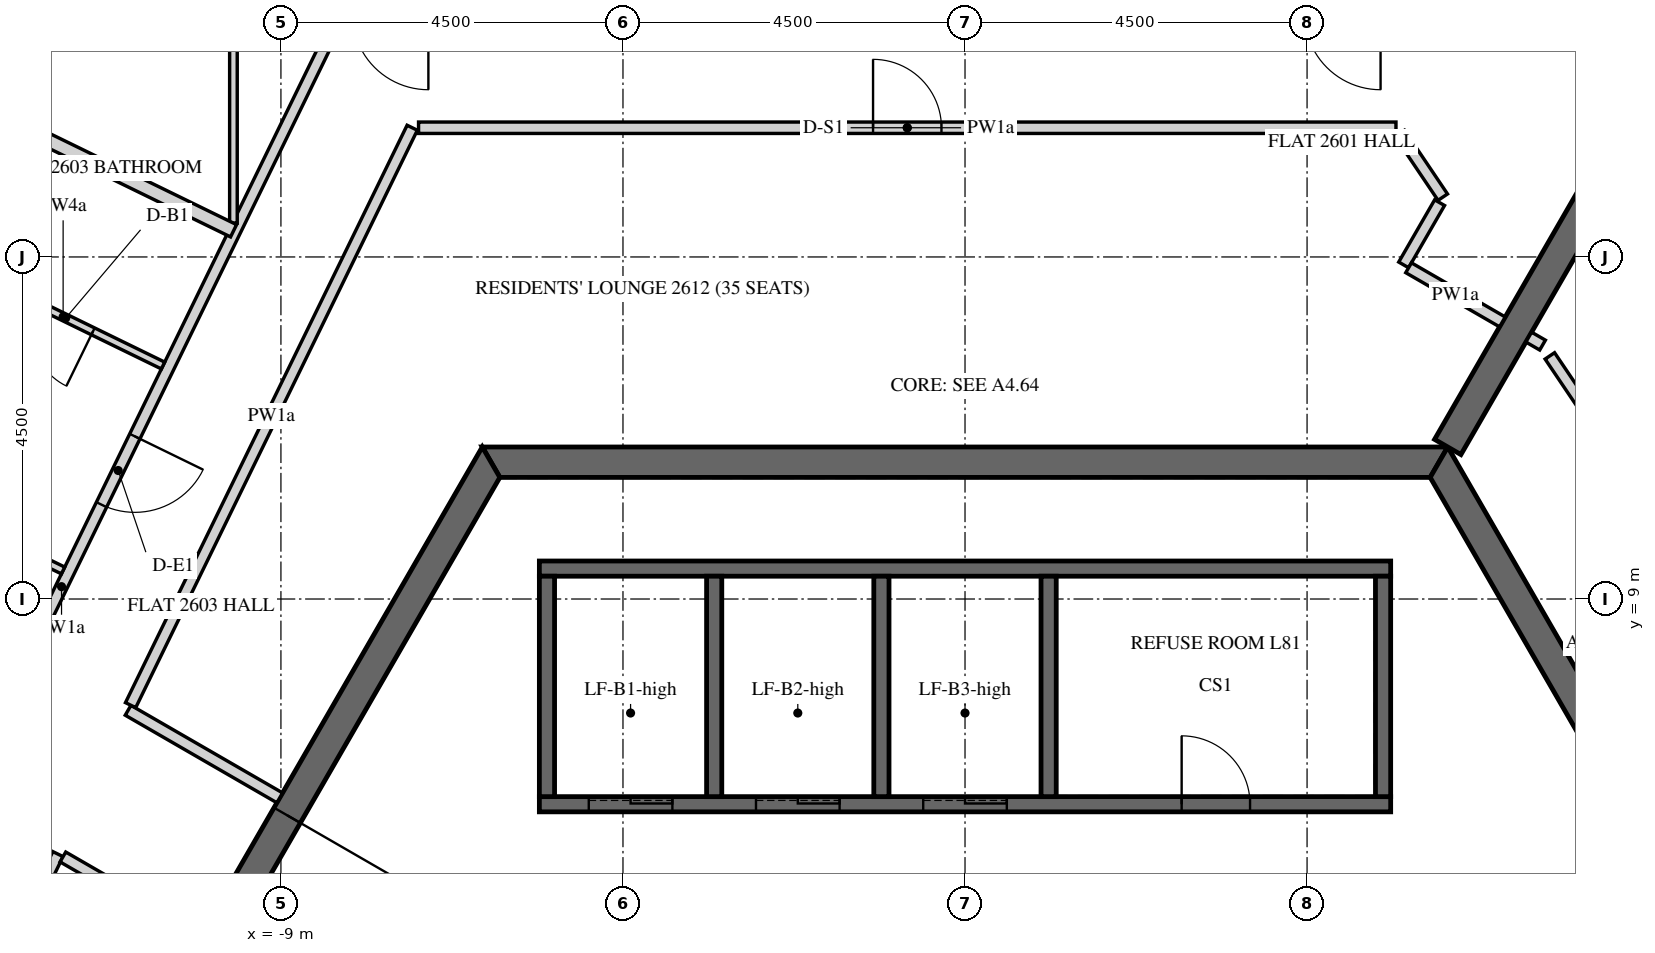
"""IFC4 building model, lengths in metres.
Left out: names, types, materials, properties, quantities, classifications, styles, units other than length and angle.
Written with IfcOpenShell. Run it as: python <this file> out.ifc"""

import sys

from ifc_helpers import new_model, si_unit, direction, frame, frame_2d, origin, place, context, subcontext, project, spatial, polyline, rectangle, outline, extrude, element, fill, save


model = new_model("IFC4")
c1 = context("Model", 3, precision=1e-05, world=origin(), true_north=direction((0.0, 1.0)))
c2 = subcontext(c1, "Body", "Model", "MODEL_VIEW")
j1 = project(units=[si_unit("LENGTHUNIT", "METRE"), si_unit("PLANEANGLEUNIT", "RADIAN")], contexts=[c1])
p1 = place(None, origin())
s1 = spatial("IfcSite", under=j1, at=p1, CompositionType="ELEMENT")
p2 = place(p1, origin())
s2 = spatial("IfcBuilding", under=s1, at=p2, CompositionType="ELEMENT")
p3 = place(p2, frame((0.0, 0.0, 334.2)))
s3 = spatial("IfcBuildingStorey", under=s2, at=p3, CompositionType="ELEMENT", Elevation=334.2)
p4 = place(p3, frame((-6.235, 10.8, -0.15), z_axis=(0.0, 0.0, 1.0), x_axis=(-0.499996419489, -0.866027470984, 0.0)))
e1 = element("IfcWall", 1, at=p4, inside=s3, PredefinedType="SHEAR", context=c2, shape_type="SweptSolid", body=[
    extrude(outline(polyline([(-0.115, -0.2), (12.586, -0.2), (12.355, 0.2), (0.115, 0.2), (-0.115, -0.2)])), origin(), (0.0, 0.0, 1.0), 3.75),
])
p5 = place(p4, frame((5.364, 0.0, 0.15)))
e2 = element("IfcOpeningElement", 2, at=p5, cuts=e1, PredefinedType="OPENING", context=c2, shape_type="SweptSolid", body=[
    extrude(rectangle(XDim=1.8, YDim=2.4, at=frame_2d((0.9, 1.2))), frame((0.0, 0.21, 0.0), z_axis=(0.0, -1.0, 0.0), x_axis=(1.0, 0.0, 0.0)), (0.0, 0.0, 1.0), 0.42),
])
p6 = place(p3, frame((12.471, 0.0, -0.15), z_axis=(0.0, 0.0, 1.0), x_axis=(-0.499996419489, 0.866027470984, 0.0)))
e3 = element("IfcWall", 3, at=p6, inside=s3, PredefinedType="SHEAR", context=c2, shape_type="SweptSolid", body=[
    extrude(outline(polyline([(-0.115, -0.2), (12.586, -0.2), (12.355, 0.2), (0.115, 0.2), (-0.115, -0.2)])), origin(), (0.0, 0.0, 1.0), 3.75),
])
p7 = place(p6, frame((5.306, 0.0, 0.15)))
e4 = element("IfcOpeningElement", 4, at=p7, cuts=e3, PredefinedType="OPENING", context=c2, shape_type="SweptSolid", body=[
    extrude(rectangle(XDim=1.8, YDim=2.4, at=frame_2d((0.9, 1.2))), frame((0.0, 0.21, 0.0), z_axis=(0.0, -1.0, 0.0), x_axis=(1.0, 0.0, 0.0)), (0.0, 0.0, 1.0), 0.42),
])
p8 = place(p3, frame((6.235, 10.8, -0.15), z_axis=(0.0, 0.0, 1.0), x_axis=(-1.0, 0.0, 0.0)))
e5 = element("IfcWall", 5, at=p8, inside=s3, PredefinedType="SHEAR", context=c2, shape_type="SweptSolid", body=[
    extrude(outline(polyline([(-0.115, -0.2), (12.586, -0.2), (12.355, 0.2), (0.115, 0.2), (-0.115, -0.2)])), origin(), (0.0, 0.0, 1.0), 3.75),
])
p9 = place(p3, frame((6.351, 11.0, -0.15), z_axis=(0.0, 0.0, 1.0), x_axis=(0.499998894578, 0.866026041999, 0.0)))
e6 = element("IfcWall", 6, at=p9, inside=s3, PredefinedType="SHEAR", context=c2, shape_type="SweptSolid", body=[
    extrude(rectangle(XDim=15.544, YDim=0.4, at=frame_2d((7.772, 0.0))), origin(), (0.0, 0.0, 1.0), 3.75),
])
p10 = place(p9, frame((6.872, 0.0, 0.15)))
e7 = element("IfcOpeningElement", 7, at=p10, cuts=e6, PredefinedType="OPENING", context=c2, shape_type="SweptSolid", body=[
    extrude(rectangle(XDim=1.8, YDim=2.4, at=frame_2d((0.9, 1.2))), frame((0.0, 0.21, 0.0), z_axis=(0.0, -1.0, 0.0), x_axis=(1.0, 0.0, 0.0)), (0.0, 0.0, 1.0), 0.42),
])
p11 = place(p3, frame((-5.6, 6.3, -0.25), z_axis=(0.0, 0.0, 1.0), x_axis=(1.0, 0.0, 0.0)))
e8 = element("IfcWall", 8, at=p11, inside=s3, PredefinedType="SHEAR", context=c2, shape_type="SweptSolid", body=[
    extrude(rectangle(XDim=11.2, YDim=0.2, at=frame_2d((5.6, 0.0))), origin(), (0.0, 0.0, 1.0), 3.9),
])
p12 = place(p11, frame((8.45, 0.0, 0.25)))
e9 = element("IfcOpeningElement", 9, at=p12, cuts=e8, PredefinedType="OPENING", context=c2, shape_type="SweptSolid", body=[
    extrude(rectangle(XDim=0.9, YDim=2.1, at=frame_2d((0.45, 1.05))), frame((0.0, 0.11, 0.0), z_axis=(0.0, -1.0, 0.0), x_axis=(1.0, 0.0, 0.0)), (0.0, 0.0, 1.0), 0.22),
])
p13 = place(p11, frame((0.65, 0.0, 0.25)))
e10 = element("IfcOpeningElement", 10, at=p13, cuts=e8, PredefinedType="OPENING", context=c2, shape_type="SweptSolid", body=[
    extrude(rectangle(XDim=1.1, YDim=2.1, at=frame_2d((0.55, 1.05))), frame((0.0, 0.11, 0.0), z_axis=(0.0, -1.0, 0.0), x_axis=(1.0, 0.0, 0.0)), (0.0, 0.0, 1.0), 0.22),
])
p14 = place(p11, frame((2.85, 0.0, 0.25)))
e11 = element("IfcOpeningElement", 11, at=p14, cuts=e8, PredefinedType="OPENING", context=c2, shape_type="SweptSolid", body=[
    extrude(rectangle(XDim=1.1, YDim=2.1, at=frame_2d((0.55, 1.05))), frame((0.0, 0.11, 0.0), z_axis=(0.0, -1.0, 0.0), x_axis=(1.0, 0.0, 0.0)), (0.0, 0.0, 1.0), 0.22),
])
p15 = place(p11, frame((5.05, 0.0, 0.25)))
e12 = element("IfcOpeningElement", 12, at=p15, cuts=e8, PredefinedType="OPENING", context=c2, shape_type="SweptSolid", body=[
    extrude(rectangle(XDim=1.1, YDim=2.1, at=frame_2d((0.55, 1.05))), frame((0.0, 0.11, 0.0), z_axis=(0.0, -1.0, 0.0), x_axis=(1.0, 0.0, 0.0)), (0.0, 0.0, 1.0), 0.22),
])
p16 = place(p3, frame((-5.6, 9.4, -0.25), z_axis=(0.0, 0.0, 1.0), x_axis=(1.0, 0.0, 0.0)))
e13 = element("IfcWall", 13, at=p16, inside=s3, PredefinedType="SHEAR", context=c2, shape_type="SweptSolid", body=[
    extrude(rectangle(XDim=11.2, YDim=0.2, at=frame_2d((5.6, 0.0))), origin(), (0.0, 0.0, 1.0), 3.9),
])
for number, where, z_axis, x_axis in (
    (14, (-5.5, 6.4, -0.25), (0.0, 0.0, 1.0), (0.0, 1.0, 0.0)),
    (15, (-3.3, 6.4, -0.25), (0.0, 0.0, 1.0), (0.0, 1.0, 0.0)),
    (16, (-1.1, 6.4, -0.25), (0.0, 0.0, 1.0), (0.0, 1.0, 0.0)),
    (17, (1.1, 6.4, -0.25), (0.0, 0.0, 1.0), (0.0, 1.0, 0.0)),
    (18, (5.5, 6.4, -0.25), (0.0, 0.0, 1.0), (0.0, 1.0, 0.0)),
):
    element("IfcWall", number, at=place(p3, frame(where, z_axis=z_axis, x_axis=x_axis)), inside=s3, PredefinedType="SHEAR", context=c2, shape_type="SweptSolid", body=[
        extrude(rectangle(XDim=2.9, YDim=0.2, at=frame_2d((1.45, 0.0))), origin(), (0.0, 0.0, 1.0), 3.9),
    ])
p17 = place(p3, frame((-8.247, 16.625, 0.0), z_axis=(0.0, 0.0, 1.0), x_axis=(-0.438376416131, -0.89879147625, 0.0)))
e19 = element("IfcWall", 19, at=p17, inside=s3, PredefinedType="PARTITIONING", context=c2, shape_type="SweptSolid", body=[
    extrude(rectangle(XDim=16.606, YDim=0.15, at=frame_2d((8.303, 0.0))), origin(), (0.0, 0.0, 1.0), 2.838),
])
p18 = place(p17, frame((6.103, 0.0, 0.0)))
e20 = element("IfcOpeningElement", 20, at=p18, cuts=e19, PredefinedType="OPENING", context=c2, shape_type="SweptSolid", body=[
    extrude(rectangle(XDim=1.0, YDim=2.1, at=frame_2d((0.5, 1.05))), frame((0.0, 0.085, 0.0), z_axis=(0.0, -1.0, 0.0), x_axis=(1.0, 0.0, 0.0)), (0.0, 0.0, 1.0), 0.17),
])
p19 = place(p3, frame((-9.016, 6.384, 0.0), z_axis=(0.0, 0.0, 1.0), x_axis=(-0.866030286288, 0.49999154316, 0.0)))
e21 = element("IfcWall", 21, at=p19, inside=s3, PredefinedType="PARTITIONING", context=c2, shape_type="SweptSolid", body=[
    extrude(rectangle(XDim=2.304, YDim=0.15, at=frame_2d((1.152, 0.0))), origin(), (0.0, 0.0, 1.0), 2.838),
])
p20 = place(p3, frame((-10.978, 7.604, 0.0), z_axis=(0.0, 0.0, 1.0), x_axis=(0.43838720727, 0.898786212902, 0.0)))
e22 = element("IfcWall", 22, at=p20, inside=s3, PredefinedType="PARTITIONING", context=c2, shape_type="SweptSolid", body=[
    extrude(rectangle(XDim=8.452, YDim=0.15, at=frame_2d((4.226, 0.0))), origin(), (0.0, 0.0, 1.0), 2.838),
])
p21 = place(p3, frame((-7.189, 15.2, 0.0), z_axis=(0.0, 0.0, 1.0), x_axis=(1.0, 0.0, 0.0)))
e23 = element("IfcWall", 23, at=p21, inside=s3, PredefinedType="PARTITIONING", context=c2, shape_type="SweptSolid", body=[
    extrude(rectangle(XDim=12.859, YDim=0.15, at=frame_2d((6.429, 0.0))), origin(), (0.0, 0.0, 1.0), 2.838),
])
p22 = place(p21, frame((5.979, 0.0, 0.0)))
e24 = element("IfcOpeningElement", 24, at=p22, cuts=e23, PredefinedType="OPENING", context=c2, shape_type="SweptSolid", body=[
    extrude(rectangle(XDim=0.9, YDim=2.1, at=frame_2d((0.45, 1.05))), frame((0.0, 0.085, 0.0), z_axis=(0.0, -1.0, 0.0), x_axis=(1.0, 0.0, 0.0)), (0.0, 0.0, 1.0), 0.17),
])
p23 = place(p3, frame((5.72, 15.125, 0.0), z_axis=(0.0, 0.0, 1.0), x_axis=(0.559095340605, -0.829103371187, 0.0)))
e25 = element("IfcWall", 25, at=p23, inside=s3, PredefinedType="PARTITIONING", context=c2, shape_type="SweptSolid", body=[
    extrude(rectangle(XDim=1.011, YDim=0.15, at=frame_2d((0.505, 0.0))), origin(), (0.0, 0.0, 1.0), 2.838),
])
p24 = place(p3, frame((6.244, 14.215, 0.0), z_axis=(0.0, 0.0, 1.0), x_axis=(-0.499998034377, -0.866026538634, 0.0)))
e26 = element("IfcWall", 26, at=p24, inside=s3, PredefinedType="PARTITIONING", context=c2, shape_type="SweptSolid", body=[
    extrude(rectangle(XDim=0.946, YDim=0.15, at=frame_2d((0.473, 0.0))), origin(), (0.0, 0.0, 1.0), 2.838),
])
p25 = place(p3, frame((5.836, 13.358, 0.0), z_axis=(0.0, 0.0, 1.0), x_axis=(0.865988727248, -0.500063520245, 0.0)))
e27 = element("IfcWall", 27, at=p25, inside=s3, PredefinedType="PARTITIONING", context=c2, shape_type="SweptSolid", body=[
    extrude(rectangle(XDim=1.425, YDim=0.15, at=frame_2d((0.712, 0.0))), origin(), (0.0, 0.0, 1.0), 2.838),
])
p26 = place(p3, frame((-14.411, 0.564, 0.0), z_axis=(0.0, 0.0, 1.0), x_axis=(0.438363210996, 0.898797916801, 0.0)))
e28 = element("IfcWall", 28, at=p26, inside=s3, PredefinedType="PARTITIONING", context=c2, shape_type="SweptSolid", body=[
    extrude(rectangle(XDim=5.652, YDim=0.15, at=frame_2d((2.826, 0.0))), origin(), (0.0, 0.0, 1.0), 2.838),
])
p27 = place(p26, frame((2.376, 0.0, 0.0)))
e29 = element("IfcOpeningElement", 29, at=p27, cuts=e28, PredefinedType="OPENING", context=c2, shape_type="SweptSolid", body=[
    extrude(rectangle(XDim=0.9, YDim=2.1, at=frame_2d((0.45, 1.05))), frame((0.0, 0.085, 0.0), z_axis=(0.0, -1.0, 0.0), x_axis=(1.0, 0.0, 0.0)), (0.0, 0.0, 1.0), 0.17),
])
p28 = place(p3, frame((-11.868, 5.606, 0.0), z_axis=(0.0, 0.0, 1.0), x_axis=(0.866033244403, -0.499986419405, 0.0)))
e30 = element("IfcWall", 30, at=p28, inside=s3, PredefinedType="PARTITIONING", context=c2, shape_type="SweptSolid", body=[
    extrude(rectangle(XDim=2.082, YDim=0.15, at=frame_2d((1.041, 0.0))), origin(), (0.0, 0.0, 1.0), 2.838),
])
p29 = place(p3, frame((7.416, 12.446, 0.0), z_axis=(0.0, 0.0, 1.0), x_axis=(0.866378867349, -0.499387282788, 0.0)))
e31 = element("IfcWall", 31, at=p29, inside=s3, PredefinedType="PARTITIONING", context=c2, shape_type="SweptSolid", body=[
    extrude(rectangle(XDim=0.21, YDim=0.15, at=frame_2d((0.105, 0.0))), origin(), (0.0, 0.0, 1.0), 2.838),
])
p30 = place(p3, frame((7.694, 12.199, 0.0), z_axis=(0.0, 0.0, 1.0), x_axis=(0.55920112739, -0.829032025392, 0.0)))
e32 = element("IfcWall", 32, at=p30, inside=s3, PredefinedType="PARTITIONING", context=c2, shape_type="SweptSolid", body=[
    extrude(rectangle(XDim=5.71, YDim=0.15, at=frame_2d((2.855, 0.0))), origin(), (0.0, 0.0, 1.0), 2.838),
])
p31 = place(p30, frame((2.405, 0.0, 0.0)))
e33 = element("IfcOpeningElement", 33, at=p31, cuts=e32, PredefinedType="OPENING", context=c2, shape_type="SweptSolid", body=[
    extrude(rectangle(XDim=0.9, YDim=2.1, at=frame_2d((0.45, 1.05))), frame((0.0, 0.085, 0.0), z_axis=(0.0, -1.0, 0.0), x_axis=(1.0, 0.0, 0.0)), (0.0, 0.0, 1.0), 0.17),
])
p32 = place(p3, frame((-9.625, 13.945, 0.0), z_axis=(0.0, 0.0, 1.0), x_axis=(0.0, 1.0, 0.0)))
e34 = element("IfcWall", 34, at=p32, inside=s3, PredefinedType="PARTITIONING", context=c2, shape_type="SweptSolid", body=[
    extrude(rectangle(XDim=6.955, YDim=0.1, at=frame_2d((3.477, 0.0))), origin(), (0.0, 0.0, 1.0), 2.838),
])
p33 = place(p32, frame((4.405, 0.0, 0.0)))
e35 = element("IfcOpeningElement", 35, at=p33, cuts=e34, PredefinedType="OPENING", context=c2, shape_type="SweptSolid", body=[
    extrude(rectangle(XDim=0.9, YDim=2.1, at=frame_2d((0.45, 1.05))), frame((0.0, 0.06, 0.0), z_axis=(0.0, -1.0, 0.0), x_axis=(1.0, 0.0, 0.0)), (0.0, 0.0, 1.0), 0.12),
])
p34 = place(p3, frame((-17.516, 17.694, 0.0), z_axis=(0.0, 0.0, 1.0), x_axis=(0.898787414812, -0.438384743092, 0.0)))
e36 = element("IfcWall", 36, at=p34, inside=s3, PredefinedType="PARTITIONING", context=c2, shape_type="SweptSolid", body=[
    extrude(rectangle(XDim=8.782, YDim=0.18, at=frame_2d((4.391, 0.0))), origin(), (0.0, 0.0, 1.0), 2.838),
])
p35 = place(p3, frame((-11.866, 9.375, 0.0), z_axis=(0.0, 0.0, 1.0), x_axis=(-0.89880694479, 0.438344699976, 0.0)))
e37 = element("IfcWall", 37, at=p35, inside=s3, PredefinedType="PARTITIONING", context=c2, shape_type="SweptSolid", body=[
    extrude(rectangle(XDim=2.925, YDim=0.1, at=frame_2d((1.462, 0.0))), origin(), (0.0, 0.0, 1.0), 2.838),
])
p36 = place(p35, frame((0.975, 0.0, 0.0)))
e38 = element("IfcOpeningElement", 38, at=p36, cuts=e37, PredefinedType="OPENING", context=c2, shape_type="SweptSolid", body=[
    extrude(rectangle(XDim=0.9, YDim=2.1, at=frame_2d((0.45, 1.05))), frame((0.0, 0.06, 0.0), z_axis=(0.0, -1.0, 0.0), x_axis=(1.0, 0.0, 0.0)), (0.0, 0.0, 1.0), 0.12),
])
p37 = place(p3, frame((-10.551, 12.072, 0.0), z_axis=(0.0, 0.0, 1.0), x_axis=(-0.898790906006, 0.438377585285, 0.0)))
e39 = element("IfcWall", 39, at=p37, inside=s3, PredefinedType="PARTITIONING", context=c2, shape_type="SweptSolid", body=[
    extrude(rectangle(XDim=2.925, YDim=0.1, at=frame_2d((1.462, 0.0))), origin(), (0.0, 0.0, 1.0), 2.838),
])
p38 = place(p37, frame((1.025, 0.0, 0.0)))
e40 = element("IfcOpeningElement", 40, at=p38, cuts=e39, PredefinedType="OPENING", context=c2, shape_type="SweptSolid", body=[
    extrude(rectangle(XDim=0.8, YDim=2.1, at=frame_2d((0.4, 1.05))), frame((0.0, 0.06, 0.0), z_axis=(0.0, -1.0, 0.0), x_axis=(1.0, 0.0, 0.0)), (0.0, 0.0, 1.0), 0.12),
])
p39 = place(p5, origin())
e41 = element("IfcDoor", 41, at=p39, inside=s3, OperationType="DOUBLE_DOOR_SINGLE_SWING", PredefinedType="DOOR", context=c2, shape_type="SweptSolid", body=[
    extrude(rectangle(XDim=1.8, YDim=2.4, at=frame_2d((0.9, 1.2))), frame((0.0, 0.025, 0.0), z_axis=(0.0, -1.0, 0.0), x_axis=(1.0, 0.0, 0.0)), (0.0, 0.0, 1.0), 0.05),
])
fill(e2, e41)
p40 = place(p12, origin())
e42 = element("IfcDoor", 42, at=p40, inside=s3, OperationType="SINGLE_SWING_LEFT", PredefinedType="DOOR", context=c2, shape_type="SweptSolid", body=[
    extrude(rectangle(XDim=0.9, YDim=2.1, at=frame_2d((0.45, 1.05))), frame((0.0, 0.025, 0.0), z_axis=(0.0, -1.0, 0.0), x_axis=(1.0, 0.0, 0.0)), (0.0, 0.0, 1.0), 0.05),
])
fill(e9, e42)
p41 = place(p13, origin())
e43 = element("IfcDoor", 43, at=p41, inside=s3, OperationType="SLIDING_TO_LEFT", PredefinedType="DOOR", context=c2, shape_type="SweptSolid", body=[
    extrude(rectangle(XDim=1.1, YDim=2.1, at=frame_2d((0.55, 1.05))), frame((0.0, 0.025, 0.0), z_axis=(0.0, -1.0, 0.0), x_axis=(1.0, 0.0, 0.0)), (0.0, 0.0, 1.0), 0.05),
])
fill(e10, e43)
p42 = place(p14, origin())
e44 = element("IfcDoor", 44, at=p42, inside=s3, OperationType="SLIDING_TO_LEFT", PredefinedType="DOOR", context=c2, shape_type="SweptSolid", body=[
    extrude(rectangle(XDim=1.1, YDim=2.1, at=frame_2d((0.55, 1.05))), frame((0.0, 0.025, 0.0), z_axis=(0.0, -1.0, 0.0), x_axis=(1.0, 0.0, 0.0)), (0.0, 0.0, 1.0), 0.05),
])
fill(e11, e44)
p43 = place(p15, origin())
e45 = element("IfcDoor", 45, at=p43, inside=s3, OperationType="SLIDING_TO_LEFT", PredefinedType="DOOR", context=c2, shape_type="SweptSolid", body=[
    extrude(rectangle(XDim=1.1, YDim=2.1, at=frame_2d((0.55, 1.05))), frame((0.0, 0.025, 0.0), z_axis=(0.0, -1.0, 0.0), x_axis=(1.0, 0.0, 0.0)), (0.0, 0.0, 1.0), 0.05),
])
fill(e12, e45)
p44 = place(p18, origin())
e46 = element("IfcDoor", 46, at=p44, inside=s3, OperationType="SINGLE_SWING_LEFT", PredefinedType="DOOR", context=c2, shape_type="SweptSolid", body=[
    extrude(rectangle(XDim=1.0, YDim=2.1, at=frame_2d((0.5, 1.05))), frame((0.0, 0.025, 0.0), z_axis=(0.0, -1.0, 0.0), x_axis=(1.0, 0.0, 0.0)), (0.0, 0.0, 1.0), 0.05),
])
fill(e20, e46)
p45 = place(p38, origin())
e47 = element("IfcDoor", 47, at=p45, inside=s3, OperationType="SINGLE_SWING_RIGHT", PredefinedType="DOOR", context=c2, shape_type="SweptSolid", body=[
    extrude(rectangle(XDim=0.8, YDim=2.1, at=frame_2d((0.4, 1.05))), frame((0.0, 0.025, 0.0), z_axis=(0.0, -1.0, 0.0), x_axis=(1.0, 0.0, 0.0)), (0.0, 0.0, 1.0), 0.05),
])
fill(e40, e47)
p46 = place(p22, origin())
e48 = element("IfcDoor", 48, at=p46, inside=s3, OperationType="SINGLE_SWING_LEFT", PredefinedType="DOOR", context=c2, shape_type="SweptSolid", body=[
    extrude(rectangle(XDim=0.9, YDim=2.1, at=frame_2d((0.45, 1.05))), frame((0.0, 0.025, 0.0), z_axis=(0.0, -1.0, 0.0), x_axis=(1.0, 0.0, 0.0)), (0.0, 0.0, 1.0), 0.05),
])
fill(e24, e48)
save(model, sys.argv[1])
